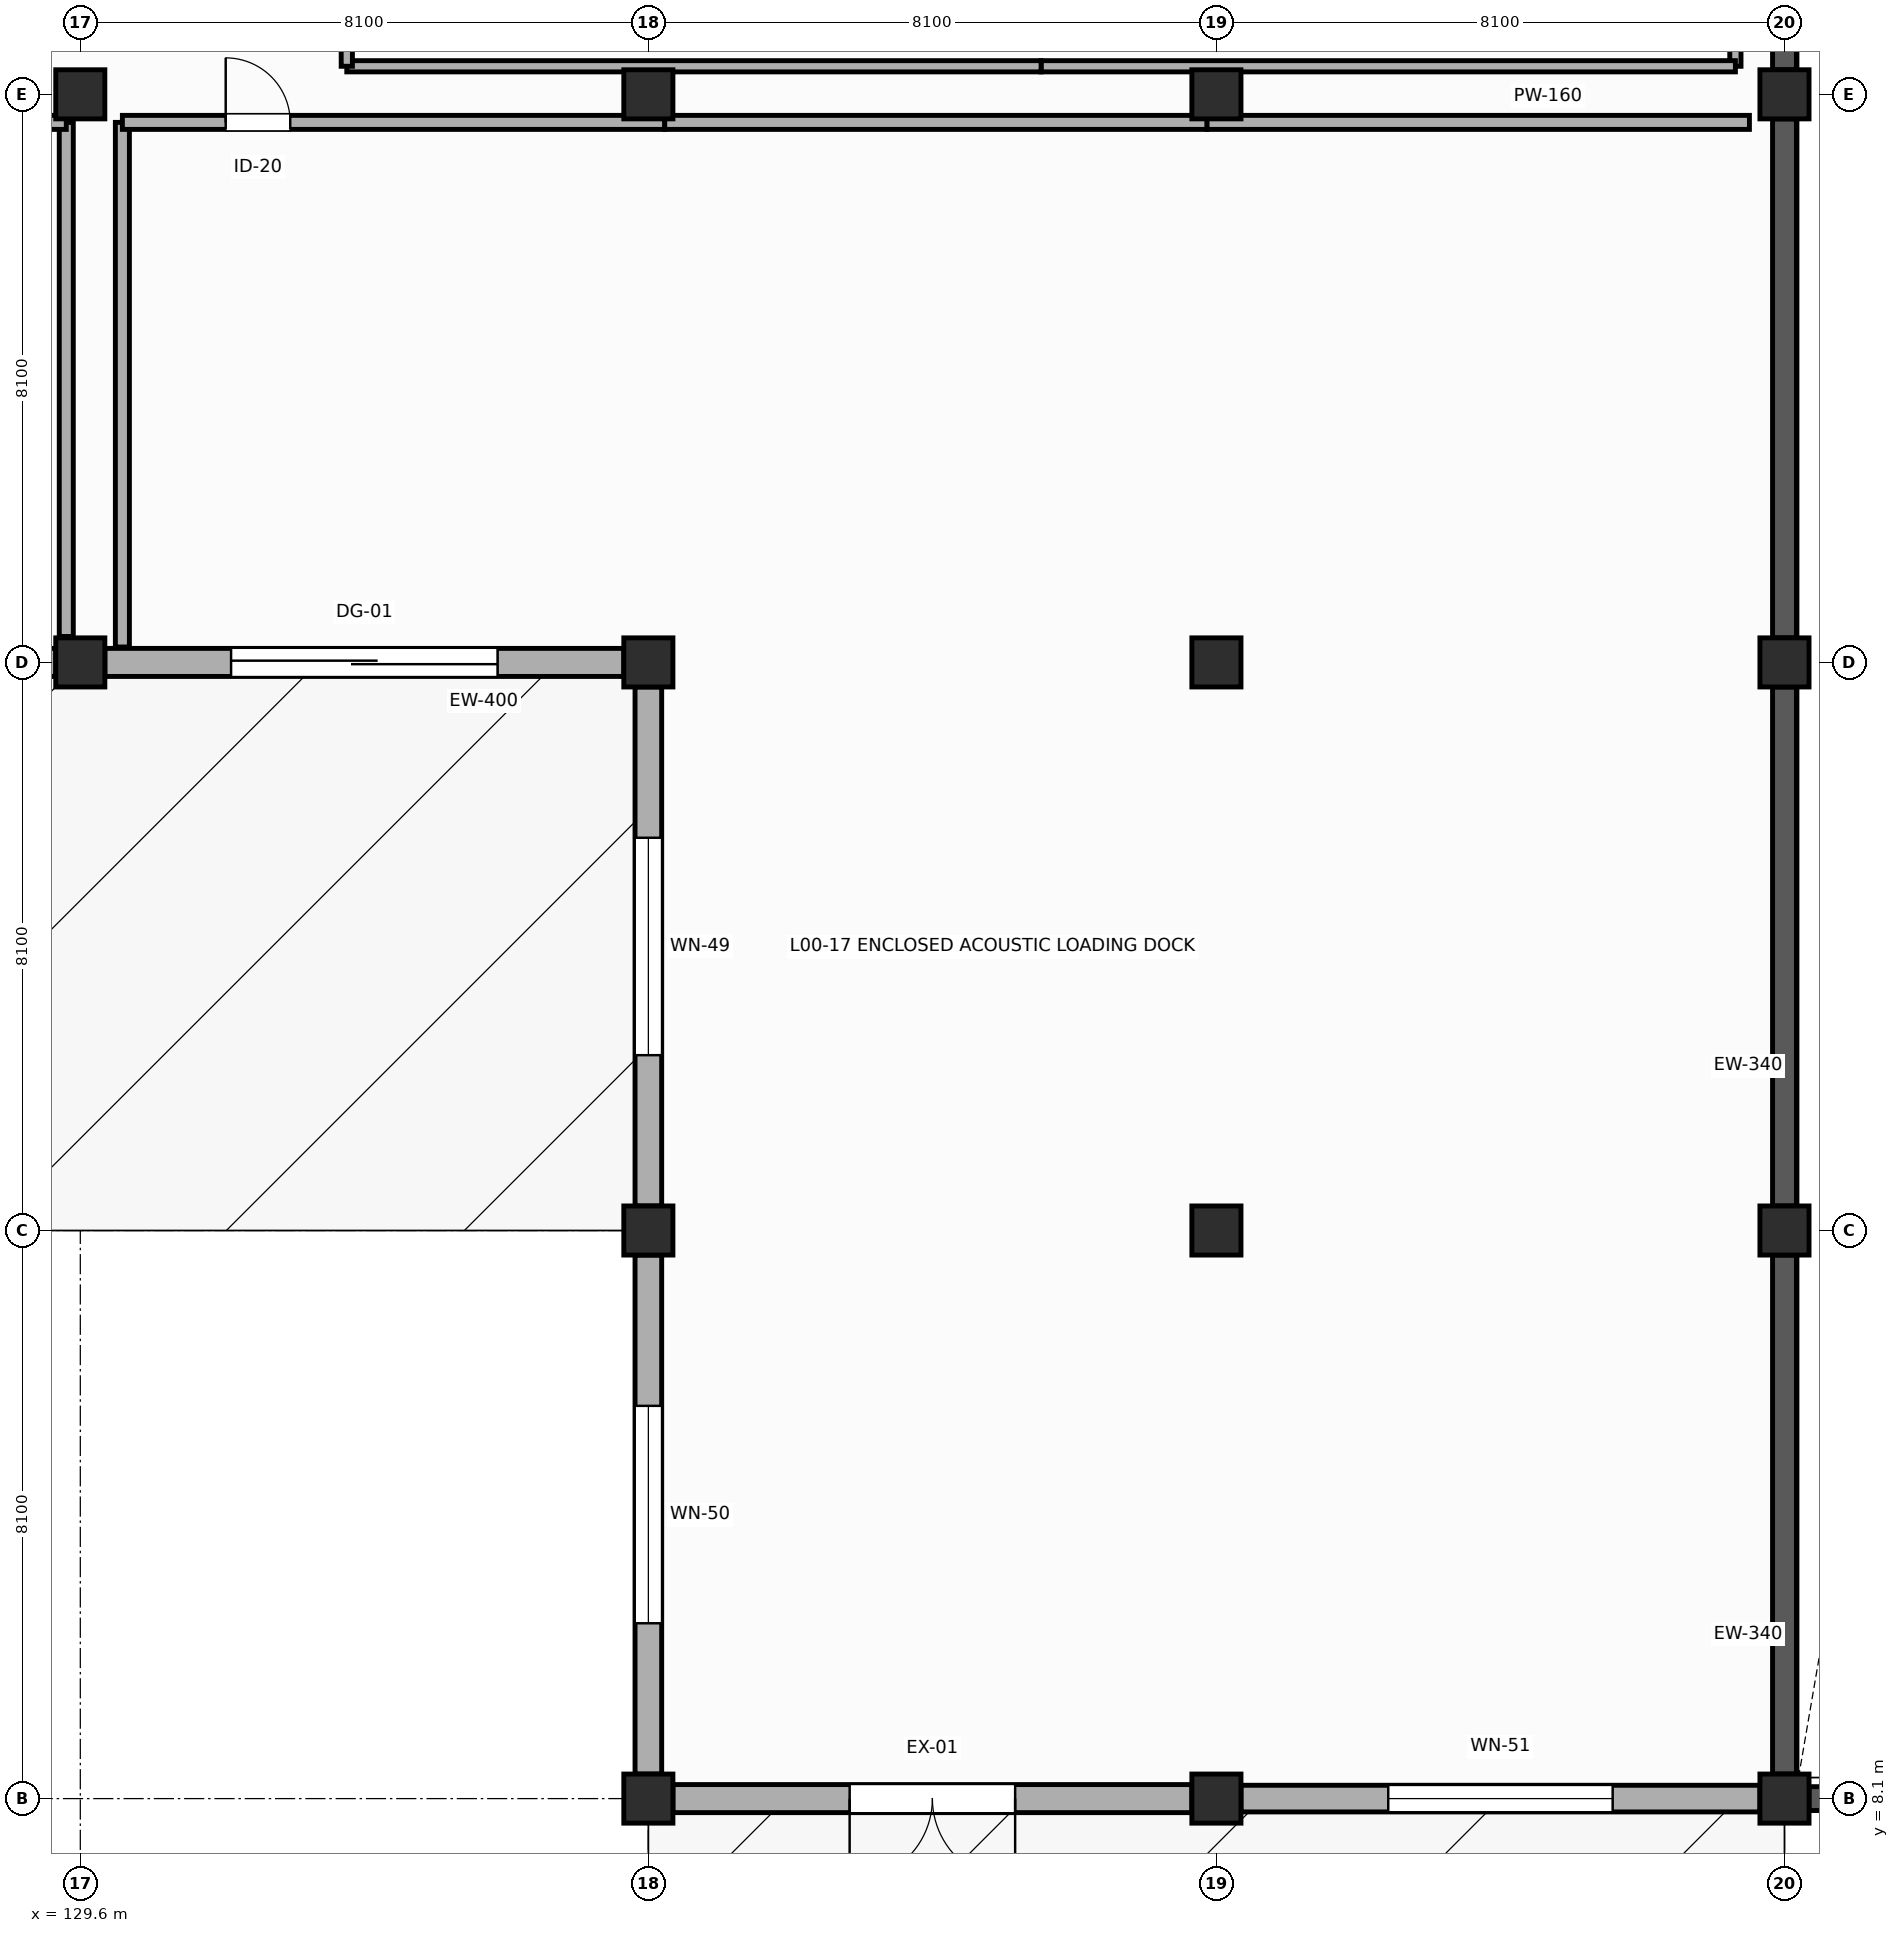
"""IFC4 building model, lengths in metres.
Left out: names, types, materials, properties, quantities, classifications, styles, units other than length and angle.
Written with IfcOpenShell. Run it as: python <this file> out.ifc"""

import sys

from ifc_helpers import new_model, si_unit, direction, frame, frame_2d, origin, origin_2d, place, context, subcontext, project, spatial, rectangle, extrude, element, fill, save


model = new_model("IFC4")
c1 = context("Model", 3, precision=1e-05, world=origin(), true_north=direction((0.0, 1.0)))
c2 = subcontext(c1, "Body", "Model", "MODEL_VIEW")
j1 = project(units=[si_unit("LENGTHUNIT", "METRE"), si_unit("PLANEANGLEUNIT", "RADIAN")], contexts=[c1])
p1 = place(None, origin())
s1 = spatial("IfcSite", under=j1, at=p1, CompositionType="ELEMENT")
p2 = place(p1, origin())
s2 = spatial("IfcBuilding", under=s1, at=p2, CompositionType="ELEMENT")
p3 = place(p2, origin())
s3 = spatial("IfcBuildingStorey", under=s2, at=p3, CompositionType="ELEMENT", Elevation=0.0)
for number, where, z_axis, x_axis in (
    (1, (129.6, 24.3, 0.0), (0.0, 0.0, 1.0), (1.0, 0.0, 0.0)),
    (2, (129.6, 32.4, 0.0), (0.0, 0.0, 1.0), (1.0, 0.0, 0.0)),
    (3, (137.7, 8.1, 0.0), (0.0, 0.0, 1.0), (1.0, 0.0, 0.0)),
    (4, (137.7, 16.2, 0.0), (0.0, 0.0, 1.0), (1.0, 0.0, 0.0)),
    (5, (137.7, 24.3, 0.0), (0.0, 0.0, 1.0), (1.0, 0.0, 0.0)),
    (6, (137.7, 32.4, 0.0), (0.0, 0.0, 1.0), (1.0, 0.0, 0.0)),
    (7, (145.8, 8.1, 0.0), (0.0, 0.0, 1.0), (1.0, 0.0, 0.0)),
    (8, (145.8, 16.2, 0.0), (0.0, 0.0, 1.0), (1.0, 0.0, 0.0)),
    (9, (145.8, 24.3, 0.0), (0.0, 0.0, 1.0), (1.0, 0.0, 0.0)),
    (10, (145.8, 32.4, 0.0), (0.0, 0.0, 1.0), (1.0, 0.0, 0.0)),
    (11, (153.9, 8.1, 0.0), (0.0, 0.0, 1.0), (1.0, 0.0, 0.0)),
    (12, (153.9, 16.2, 0.0), (0.0, 0.0, 1.0), (1.0, 0.0, 0.0)),
    (13, (153.9, 24.3, 0.0), (0.0, 0.0, 1.0), (1.0, 0.0, 0.0)),
    (14, (153.9, 32.4, 0.0), (0.0, 0.0, 1.0), (1.0, 0.0, 0.0)),
):
    element("IfcColumn", number, at=place(p3, frame(where, z_axis=z_axis, x_axis=x_axis)), inside=s3, PredefinedType="COLUMN", context=c2, shape_type="SweptSolid", body=[
        extrude(rectangle(XDim=0.7, YDim=0.7, at=origin_2d()), origin(), (0.0, 0.0, 1.0), 5.4),
    ])
p4 = place(p3, frame((129.25, 24.3, 0.0), z_axis=(0.0, 0.0, 1.0), x_axis=(-1.0, 0.0, 0.0)))
e15 = element("IfcWall", 15, at=p4, inside=s3, PredefinedType="SOLIDWALL", context=c2, shape_type="SweptSolid", body=[
    extrude(rectangle(XDim=7.4, YDim=0.4, at=frame_2d((3.7, 0.0))), origin(), (0.0, 0.0, 1.0), 4.695),
])
p5 = place(p4, frame((1.8, 0.0, 0.0)))
e16 = element("IfcOpeningElement", 16, at=p5, cuts=e15, PredefinedType="OPENING", context=c2, shape_type="SweptSolid", body=[
    extrude(rectangle(XDim=3.8, YDim=3.6, at=frame_2d((1.9, 1.8))), frame((0.0, 0.21, 0.0), z_axis=(0.0, -1.0, 0.0), x_axis=(1.0, 0.0, 0.0)), (0.0, 0.0, 1.0), 0.42),
])
p6 = place(p3, frame((137.35, 24.3, 0.0), z_axis=(0.0, 0.0, 1.0), x_axis=(-1.0, 0.0, 0.0)))
e17 = element("IfcWall", 17, at=p6, inside=s3, PredefinedType="SOLIDWALL", context=c2, shape_type="SweptSolid", body=[
    extrude(rectangle(XDim=7.4, YDim=0.4, at=frame_2d((3.7, 0.0))), origin(), (0.0, 0.0, 1.0), 4.747),
])
p7 = place(p6, frame((1.8, 0.0, 0.0)))
e18 = element("IfcOpeningElement", 18, at=p7, cuts=e17, PredefinedType="OPENING", context=c2, shape_type="SweptSolid", body=[
    extrude(rectangle(XDim=3.8, YDim=3.6, at=frame_2d((1.9, 1.8))), frame((0.0, 0.21, 0.0), z_axis=(0.0, -1.0, 0.0), x_axis=(1.0, 0.0, 0.0)), (0.0, 0.0, 1.0), 0.42),
])
p8 = place(p3, frame((145.45, 8.1, 0.0), z_axis=(0.0, 0.0, 1.0), x_axis=(-1.0, 0.0, 0.0)))
e19 = element("IfcWall", 19, at=p8, inside=s3, PredefinedType="SOLIDWALL", context=c2, shape_type="SweptSolid", body=[
    extrude(rectangle(XDim=7.4, YDim=0.4, at=frame_2d((3.7, 0.0))), origin(), (0.0, 0.0, 1.0), 4.695),
])
p9 = place(p8, frame((2.52, 0.0, 0.0)))
e20 = element("IfcOpeningElement", 20, at=p9, cuts=e19, PredefinedType="OPENING", context=c2, shape_type="SweptSolid", body=[
    extrude(rectangle(XDim=2.36, YDim=2.4, at=frame_2d((1.18, 1.2))), frame((0.0, 0.21, 0.0), z_axis=(0.0, -1.0, 0.0), x_axis=(1.0, 0.0, 0.0)), (0.0, 0.0, 1.0), 0.42),
])
p10 = place(p3, frame((153.9, 8.45, 0.0), z_axis=(0.0, 0.0, 1.0), x_axis=(0.0, 1.0, 0.0)))
e21 = element("IfcWall", 21, at=p10, inside=s3, PredefinedType="SOLIDWALL", context=c2, shape_type="SweptSolid", body=[
    extrude(rectangle(XDim=7.4, YDim=0.34, at=frame_2d((3.7, 0.0))), origin(), (0.0, 0.0, 1.0), 5.05),
])
p11 = place(p3, frame((153.9, 16.55, 0.0), z_axis=(0.0, 0.0, 1.0), x_axis=(0.0, 1.0, 0.0)))
e22 = element("IfcWall", 22, at=p11, inside=s3, PredefinedType="SOLIDWALL", context=c2, shape_type="SweptSolid", body=[
    extrude(rectangle(XDim=7.4, YDim=0.34, at=frame_2d((3.7, 0.0))), origin(), (0.0, 0.0, 1.0), 5.05),
])
p12 = place(p3, frame((153.9, 24.65, 0.0), z_axis=(0.0, 0.0, 1.0), x_axis=(0.0, 1.0, 0.0)))
e23 = element("IfcWall", 23, at=p12, inside=s3, PredefinedType="SOLIDWALL", context=c2, shape_type="SweptSolid", body=[
    extrude(rectangle(XDim=7.4, YDim=0.34, at=frame_2d((3.7, 0.0))), origin(), (0.0, 0.0, 1.0), 5.05),
])
for number, where, z_axis, x_axis in (
    (24, (153.9, 32.75, 0.0), (0.0, 0.0, 1.0), (0.0, 1.0, 0.0)),
    (25, (154.25, 8.1, 0.0), (0.0, 0.0, 1.0), (1.0, 0.0, 0.0)),
):
    element("IfcWall", number, at=place(p3, frame(where, z_axis=z_axis, x_axis=x_axis)), inside=s3, PredefinedType="SOLIDWALL", context=c2, shape_type="SweptSolid", body=[
        extrude(rectangle(XDim=7.4, YDim=0.34, at=frame_2d((3.7, 0.0))), origin(), (0.0, 0.0, 1.0), 5.05),
    ])
p13 = place(p3, frame((137.7, 23.95, 0.0), z_axis=(0.0, 0.0, 1.0), x_axis=(0.0, -1.0, 0.0)))
e26 = element("IfcWall", 26, at=p13, inside=s3, PredefinedType="SOLIDWALL", context=c2, shape_type="SweptSolid", body=[
    extrude(rectangle(XDim=7.4, YDim=0.38, at=frame_2d((3.7, 0.0))), origin(), (0.0, 0.0, 1.0), 4.807),
])
p14 = place(p13, frame((2.15, 0.0, 0.9)))
e27 = element("IfcOpeningElement", 27, at=p14, cuts=e26, PredefinedType="OPENING", context=c2, shape_type="SweptSolid", body=[
    extrude(rectangle(XDim=3.1, YDim=1.5, at=frame_2d((1.55, 0.75))), frame((0.0, 0.2, 0.0), z_axis=(0.0, -1.0, 0.0), x_axis=(1.0, 0.0, 0.0)), (0.0, 0.0, 1.0), 0.4),
])
p15 = place(p3, frame((137.7, 15.85, 0.0), z_axis=(0.0, 0.0, 1.0), x_axis=(0.0, -1.0, 0.0)))
e28 = element("IfcWall", 28, at=p15, inside=s3, PredefinedType="SOLIDWALL", context=c2, shape_type="SweptSolid", body=[
    extrude(rectangle(XDim=7.4, YDim=0.38, at=frame_2d((3.7, 0.0))), origin(), (0.0, 0.0, 1.0), 4.807),
])
p16 = place(p15, frame((2.15, 0.0, 0.9)))
e29 = element("IfcOpeningElement", 29, at=p16, cuts=e28, PredefinedType="OPENING", context=c2, shape_type="SweptSolid", body=[
    extrude(rectangle(XDim=3.1, YDim=2.0, at=frame_2d((1.55, 1.0))), frame((0.0, 0.2, 0.0), z_axis=(0.0, -1.0, 0.0), x_axis=(1.0, 0.0, 0.0)), (0.0, 0.0, 1.0), 0.4),
])
p17 = place(p3, frame((146.15, 8.1, 0.0), z_axis=(0.0, 0.0, 1.0), x_axis=(1.0, 0.0, 0.0)))
e30 = element("IfcWall", 30, at=p17, inside=s3, PredefinedType="SOLIDWALL", context=c2, shape_type="SweptSolid", body=[
    extrude(rectangle(XDim=7.4, YDim=0.38, at=frame_2d((3.7, 0.0))), origin(), (0.0, 0.0, 1.0), 4.747),
])
p18 = place(p17, frame((2.1, 0.0, 0.9)))
e31 = element("IfcOpeningElement", 31, at=p18, cuts=e30, PredefinedType="OPENING", context=c2, shape_type="SweptSolid", body=[
    extrude(rectangle(XDim=3.2, YDim=1.7, at=frame_2d((1.6, 0.85))), frame((0.0, 0.2, 0.0), z_axis=(0.0, -1.0, 0.0), x_axis=(1.0, 0.0, 0.0)), (0.0, 0.0, 1.0), 0.4),
])
p19 = place(p3, frame((130.2, 24.52, 0.0), z_axis=(0.0, 0.0, 1.0), x_axis=(0.0, 1.0, 0.0)))
e32 = element("IfcWall", 32, at=p19, inside=s3, PredefinedType="PARTITIONING", context=c2, shape_type="SweptSolid", body=[
    extrude(rectangle(XDim=7.48, YDim=0.2, at=frame_2d((3.74, 0.0))), origin(), (0.0, 0.0, 1.0), 5.12),
])
p20 = place(p3, frame((130.2, 32.0, 0.0), z_axis=(0.0, 0.0, 1.0), x_axis=(1.0, 0.0, 0.0)))
e33 = element("IfcWall", 33, at=p20, inside=s3, PredefinedType="PARTITIONING", context=c2, shape_type="SweptSolid", body=[
    extrude(rectangle(XDim=7.733, YDim=0.2, at=frame_2d((3.867, 0.0))), origin(), (0.0, 0.0, 1.0), 5.12),
])
p21 = place(p20, frame((1.473, 0.0, 0.0)))
e34 = element("IfcOpeningElement", 34, at=p21, cuts=e33, PredefinedType="OPENING", context=c2, shape_type="SweptSolid", body=[
    extrude(rectangle(XDim=0.92, YDim=2.1, at=frame_2d((0.46, 1.05))), frame((0.0, 0.11, 0.0), z_axis=(0.0, -1.0, 0.0), x_axis=(1.0, 0.0, 0.0)), (0.0, 0.0, 1.0), 0.22),
])
p22 = place(p3, frame((137.933, 32.0, 0.0), z_axis=(0.0, 0.0, 1.0), x_axis=(1.0, 0.0, 0.0)))
e35 = element("IfcWall", 35, at=p22, inside=s3, PredefinedType="PARTITIONING", context=c2, shape_type="SweptSolid", body=[
    extrude(rectangle(XDim=7.733, YDim=0.2, at=frame_2d((3.867, 0.0))), origin(), (0.0, 0.0, 1.0), 5.12),
])
p23 = place(p3, frame((145.667, 32.0, 0.0), z_axis=(0.0, 0.0, 1.0), x_axis=(1.0, 0.0, 0.0)))
e36 = element("IfcWall", 36, at=p23, inside=s3, PredefinedType="PARTITIONING", context=c2, shape_type="SweptSolid", body=[
    extrude(rectangle(XDim=7.733, YDim=0.2, at=frame_2d((3.867, 0.0))), origin(), (0.0, 0.0, 1.0), 5.12),
])
p24 = place(p3, frame((129.4, 32.0, 0.0), z_axis=(0.0, 0.0, 1.0), x_axis=(0.0, -1.0, 0.0)))
e37 = element("IfcWall", 37, at=p24, inside=s3, PredefinedType="PARTITIONING", context=c2, shape_type="SweptSolid", body=[
    extrude(rectangle(XDim=7.33, YDim=0.2, at=frame_2d((3.665, 0.0))), origin(), (0.0, 0.0, 1.0), 4.564),
])
p25 = place(p3, frame((121.7, 32.0, 0.0), z_axis=(0.0, 0.0, 1.0), x_axis=(1.0, 0.0, 0.0)))
e38 = element("IfcWall", 38, at=p25, inside=s3, PredefinedType="PARTITIONING", context=c2, shape_type="SweptSolid", body=[
    extrude(rectangle(XDim=7.7, YDim=0.2, at=frame_2d((3.85, 0.0))), origin(), (0.0, 0.0, 1.0), 4.264),
])
p26 = place(p3, frame((153.2, 40.4, 0.0), z_axis=(0.0, 0.0, 1.0), x_axis=(0.0, -1.0, 0.0)))
e39 = element("IfcWall", 39, at=p26, inside=s3, PredefinedType="PARTITIONING", context=c2, shape_type="SweptSolid", body=[
    extrude(rectangle(XDim=7.6, YDim=0.16, at=frame_2d((3.8, 0.0))), origin(), (0.0, 0.0, 1.0), 5.12),
])
p27 = place(p3, frame((153.2, 32.8, 0.0), z_axis=(0.0, 0.0, 1.0), x_axis=(-1.0, 0.0, 0.0)))
e40 = element("IfcWall", 40, at=p27, inside=s3, PredefinedType="PARTITIONING", context=c2, shape_type="SweptSolid", body=[
    extrude(rectangle(XDim=9.9, YDim=0.16, at=frame_2d((4.95, 0.0))), origin(), (0.0, 0.0, 1.0), 5.12),
])
p28 = place(p3, frame((143.3, 32.8, 0.0), z_axis=(0.0, 0.0, 1.0), x_axis=(-1.0, 0.0, 0.0)))
e41 = element("IfcWall", 41, at=p28, inside=s3, PredefinedType="PARTITIONING", context=c2, shape_type="SweptSolid", body=[
    extrude(rectangle(XDim=9.9, YDim=0.16, at=frame_2d((4.95, 0.0))), origin(), (0.0, 0.0, 1.0), 5.12),
])
p29 = place(p3, frame((133.4, 32.8, 0.0), z_axis=(0.0, 0.0, 1.0), x_axis=(0.0, 1.0, 0.0)))
e42 = element("IfcWall", 42, at=p29, inside=s3, PredefinedType="PARTITIONING", context=c2, shape_type="SweptSolid", body=[
    extrude(rectangle(XDim=7.6, YDim=0.16, at=frame_2d((3.8, 0.0))), origin(), (0.0, 0.0, 1.0), 5.12),
])
p30 = place(p7, origin())
e43 = element("IfcDoor", 43, at=p30, inside=s3, OperationType="SINGLE_SWING_LEFT", PredefinedType="GATE", context=c2, shape_type="SweptSolid", body=[
    extrude(rectangle(XDim=3.8, YDim=3.6, at=frame_2d((1.9, 1.8))), frame((0.0, 0.025, 0.0), z_axis=(0.0, -1.0, 0.0), x_axis=(1.0, 0.0, 0.0)), (0.0, 0.0, 1.0), 0.05),
])
fill(e18, e43)
p31 = place(p9, origin())
e44 = element("IfcDoor", 44, at=p31, inside=s3, OperationType="DOUBLE_DOOR_SINGLE_SWING", PredefinedType="DOOR", context=c2, shape_type="SweptSolid", body=[
    extrude(rectangle(XDim=2.36, YDim=2.4, at=frame_2d((1.18, 1.2))), frame((0.0, 0.025, 0.0), z_axis=(0.0, -1.0, 0.0), x_axis=(1.0, 0.0, 0.0)), (0.0, 0.0, 1.0), 0.05),
])
fill(e20, e44)
p32 = place(p14, origin())
e45 = element("IfcWindow", 45, at=p32, inside=s3, PartitioningType="SINGLE_PANEL", PredefinedType="WINDOW", context=c2, shape_type="SweptSolid", body=[
    extrude(rectangle(XDim=3.1, YDim=1.5, at=frame_2d((1.55, 0.75))), frame((0.0, 0.03, 0.0), z_axis=(0.0, -1.0, 0.0), x_axis=(1.0, 0.0, 0.0)), (0.0, 0.0, 1.0), 0.06),
])
fill(e27, e45)
p33 = place(p16, origin())
e46 = element("IfcWindow", 46, at=p33, inside=s3, PartitioningType="SINGLE_PANEL", PredefinedType="WINDOW", context=c2, shape_type="SweptSolid", body=[
    extrude(rectangle(XDim=3.1, YDim=2.0, at=frame_2d((1.55, 1.0))), frame((0.0, 0.03, 0.0), z_axis=(0.0, -1.0, 0.0), x_axis=(1.0, 0.0, 0.0)), (0.0, 0.0, 1.0), 0.06),
])
fill(e29, e46)
p34 = place(p18, origin())
e47 = element("IfcWindow", 47, at=p34, inside=s3, PartitioningType="SINGLE_PANEL", PredefinedType="WINDOW", context=c2, shape_type="SweptSolid", body=[
    extrude(rectangle(XDim=3.2, YDim=1.7, at=frame_2d((1.6, 0.85))), frame((0.0, 0.03, 0.0), z_axis=(0.0, -1.0, 0.0), x_axis=(1.0, 0.0, 0.0)), (0.0, 0.0, 1.0), 0.06),
])
fill(e31, e47)
p35 = place(p21, origin())
e48 = element("IfcDoor", 48, at=p35, inside=s3, OperationType="SINGLE_SWING_LEFT", PredefinedType="DOOR", context=c2, shape_type="SweptSolid", body=[
    extrude(rectangle(XDim=0.92, YDim=2.1, at=frame_2d((0.46, 1.05))), frame((0.0, 0.025, 0.0), z_axis=(0.0, -1.0, 0.0), x_axis=(1.0, 0.0, 0.0)), (0.0, 0.0, 1.0), 0.05),
])
fill(e34, e48)
save(model, sys.argv[1])
